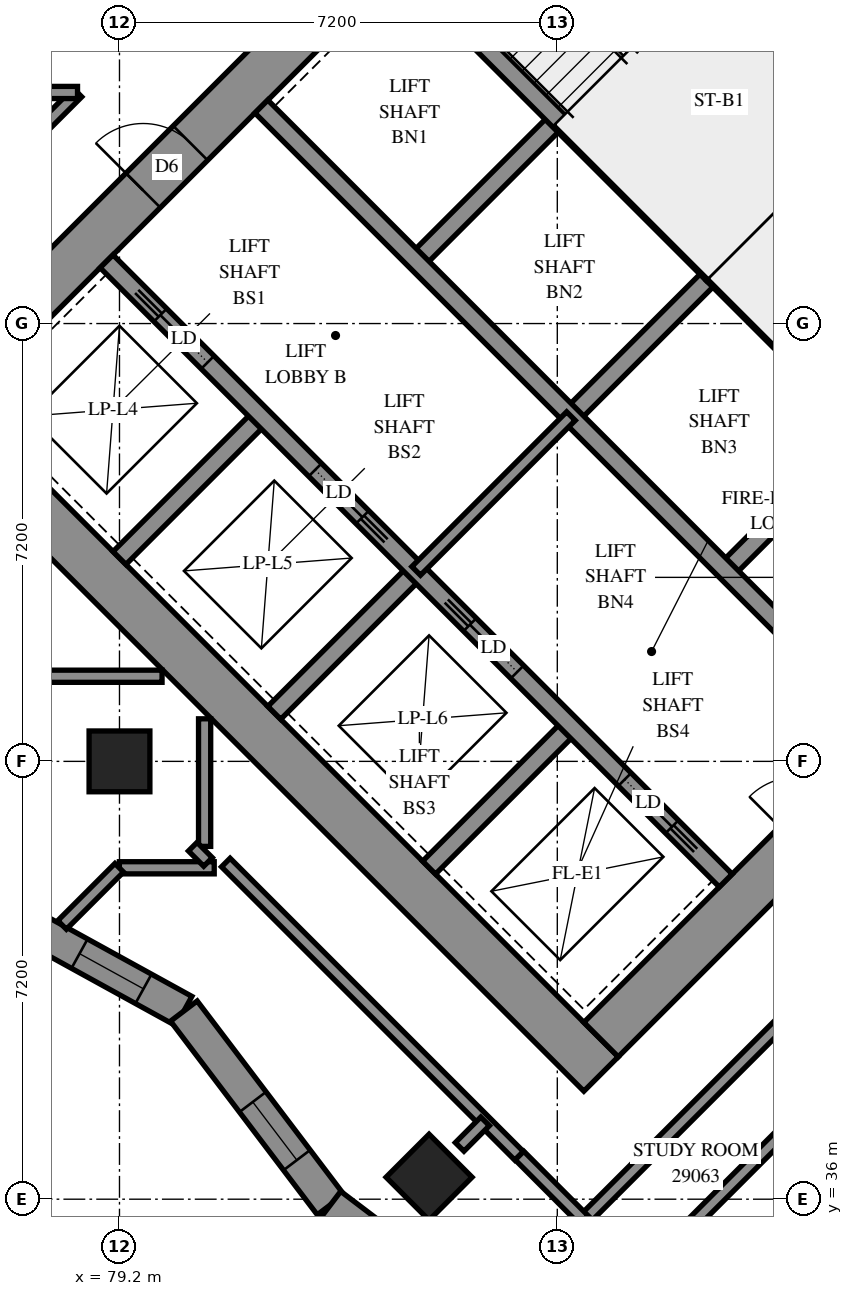
"""IFC4 building model, lengths in metres.
Left out: names, types, materials, properties, quantities, classifications, styles, units other than length and angle.
Written with IfcOpenShell. Run it as: python <this file> out.ifc"""

import sys

from ifc_helpers import new_model, si_unit, direction, frame, frame_2d, origin, origin_2d, place, context, subcontext, project, spatial, polyline, rectangle, outline, extrude, element, fill, save


model = new_model("IFC4")
c1 = context("Model", 3, precision=1e-05, world=origin(), true_north=direction((0.0, 1.0)))
c2 = subcontext(c1, "Body", "Model", "MODEL_VIEW")
j1 = project(units=[si_unit("LENGTHUNIT", "METRE"), si_unit("PLANEANGLEUNIT", "RADIAN")], contexts=[c1])
p1 = place(None, origin())
s1 = spatial("IfcSite", under=j1, at=p1, CompositionType="ELEMENT")
p2 = place(p1, origin())
s2 = spatial("IfcBuilding", under=s1, at=p2, CompositionType="ELEMENT")
p3 = place(p2, frame((0.0, 0.0, 108.4)))
s3 = spatial("IfcBuildingStorey", under=s2, at=p3, CompositionType="ELEMENT", Elevation=108.4)
for number, where, z_axis, x_axis in (
    (1, (79.2, 43.2, 0.0), (0.0, 0.0, 1.0), (1.0, 0.0, 0.0)),
    (2, (84.291, 36.362, 0.0), (0.0, 0.0, 1.0), (0.707, -0.707, 0.0)),
):
    element("IfcColumn", number, at=place(p3, frame(where, z_axis=z_axis, x_axis=x_axis)), inside=s3, PredefinedType="COLUMN", context=c2, shape_type="SweptSolid", body=[
        extrude(rectangle(XDim=1.0, YDim=1.0, at=origin_2d()), origin(), (0.0, 0.0, 1.0), 3.1),
    ])
p4 = place(p3, frame((75.806, 49.373, -0.3), z_axis=(0.0, 0.0, 1.0), x_axis=(0.7071067812, -0.7071067812, 0.0)))
e3 = element("IfcWall", 3, at=p4, inside=s3, PredefinedType="SHEAR", context=c2, shape_type="SweptSolid", body=[
    extrude(rectangle(XDim=16.0, YDim=0.8, at=frame_2d((8.0, 0.0))), origin(), (0.0, 0.0, 1.0), 2.7),
])
p5 = place(p3, frame((86.554, 60.121, -0.3), z_axis=(0.0, 0.0, 1.0), x_axis=(0.7071067812, -0.7071067812, 0.0)))
e4 = element("IfcWall", 4, at=p5, inside=s3, PredefinedType="SHEAR", context=c2, shape_type="SweptSolid", body=[
    extrude(rectangle(XDim=16.0, YDim=0.8, at=frame_2d((8.0, 0.0))), origin(), (0.0, 0.0, 1.0), 2.7),
])
p6 = place(p5, frame((10.8, 0.0, 0.3)))
e5 = element("IfcOpeningElement", 5, at=p6, cuts=e4, PredefinedType="OPENING", context=c2, shape_type="SweptSolid", body=[
    extrude(rectangle(XDim=0.8, YDim=2.1, at=frame_2d((0.4, 1.05))), frame((0.0, 0.41, 0.0), z_axis=(0.0, -1.0, 0.0), x_axis=(1.0, 0.0, 0.0)), (0.0, 0.0, 1.0), 0.82),
])
p7 = place(p3, frame((76.372, 49.373, -0.3), z_axis=(0.0, 0.0, 1.0), x_axis=(0.7071067812, 0.7071067812, 0.0)))
e6 = element("IfcWall", 6, at=p7, inside=s3, PredefinedType="SHEAR", context=c2, shape_type="SweptSolid", body=[
    extrude(rectangle(XDim=14.4, YDim=0.8, at=frame_2d((7.2, 0.0))), origin(), (0.0, 0.0, 1.0), 2.7),
])
p8 = place(p7, frame((4.55, 0.0, 0.3)))
e7 = element("IfcOpeningElement", 7, at=p8, cuts=e6, PredefinedType="OPENING", context=c2, shape_type="SweptSolid", body=[
    extrude(rectangle(XDim=1.1, YDim=2.1, at=frame_2d((0.55, 1.05))), frame((0.0, 0.41, 0.0), z_axis=(0.0, -1.0, 0.0), x_axis=(1.0, 0.0, 0.0)), (0.0, 0.0, 1.0), 0.82),
])
p9 = place(p7, frame((11.35, 0.0, 0.3)))
e8 = element("IfcOpeningElement", 8, at=p9, cuts=e6, PredefinedType="OPENING", context=c2, shape_type="SweptSolid", body=[
    extrude(rectangle(XDim=1.1, YDim=2.1, at=frame_2d((0.55, 1.05))), frame((0.0, 0.41, 0.0), z_axis=(0.0, -1.0, 0.0), x_axis=(1.0, 0.0, 0.0)), (0.0, 0.0, 1.0), 0.82),
])
p10 = place(p3, frame((87.12, 38.625, -0.3), z_axis=(0.0, 0.0, 1.0), x_axis=(0.7071067812, 0.7071067812, 0.0)))
e9 = element("IfcWall", 9, at=p10, inside=s3, PredefinedType="SHEAR", context=c2, shape_type="SweptSolid", body=[
    extrude(rectangle(XDim=14.4, YDim=0.8, at=frame_2d((7.2, 0.0))), origin(), (0.0, 0.0, 1.0), 2.7),
])
p11 = place(p10, frame((4.55, 0.0, 0.3)))
e10 = element("IfcOpeningElement", 10, at=p11, cuts=e9, PredefinedType="OPENING", context=c2, shape_type="SweptSolid", body=[
    extrude(rectangle(XDim=1.1, YDim=2.1, at=frame_2d((0.55, 1.05))), frame((0.0, 0.41, 0.0), z_axis=(0.0, -1.0, 0.0), x_axis=(1.0, 0.0, 0.0)), (0.0, 0.0, 1.0), 0.82),
])
p12 = place(p10, frame((11.35, 0.0, 0.3)))
e11 = element("IfcOpeningElement", 11, at=p12, cuts=e9, PredefinedType="OPENING", context=c2, shape_type="SweptSolid", body=[
    extrude(rectangle(XDim=1.1, YDim=2.1, at=frame_2d((0.55, 1.05))), frame((0.0, 0.41, 0.0), z_axis=(0.0, -1.0, 0.0), x_axis=(1.0, 0.0, 0.0)), (0.0, 0.0, 1.0), 0.82),
])
for number, where, z_axis, x_axis in (
    (12, (79.2, 46.544, 0.0), (0.0, 0.0, 1.0), (0.707, 0.707, 0.0)),
    (13, (84.079, 51.423, 0.0), (0.0, 0.0, 1.0), (0.707, 0.707, 0.0)),
):
    element("IfcWall", number, at=place(p3, frame(where, z_axis=z_axis, x_axis=x_axis)), inside=s3, PredefinedType="SOLIDWALL", context=c2, shape_type="SweptSolid", body=[
        extrude(rectangle(XDim=3.3, YDim=0.3, at=frame_2d((1.65, 0.0))), origin(), (0.0, 0.0, 1.0), 3.1),
    ])
p13 = place(p3, frame((81.746, 43.999, 0.0), z_axis=(0.0, 0.0, 1.0), x_axis=(0.7071067812, 0.7071067812, 0.0)))
e14 = element("IfcWall", 14, at=p13, inside=s3, PredefinedType="SOLIDWALL", context=c2, shape_type="SweptSolid", body=[
    extrude(rectangle(XDim=3.3, YDim=0.3, at=frame_2d((1.65, 0.0))), origin(), (0.0, 0.0, 1.0), 3.1),
])
p14 = place(p3, frame((86.625, 48.878, 0.0), z_axis=(0.0, 0.0, 1.0), x_axis=(0.7071067812, 0.7071067812, 0.0)))
e15 = element("IfcWall", 15, at=p14, inside=s3, PredefinedType="SOLIDWALL", context=c2, shape_type="SweptSolid", body=[
    extrude(rectangle(XDim=3.3, YDim=0.3, at=frame_2d((1.65, 0.0))), origin(), (0.0, 0.0, 1.0), 3.1),
])
p15 = place(p3, frame((84.291, 41.453, 0.0), z_axis=(0.0, 0.0, 1.0), x_axis=(0.7071067812, 0.7071067812, 0.0)))
e16 = element("IfcWall", 16, at=p15, inside=s3, PredefinedType="SOLIDWALL", context=c2, shape_type="SweptSolid", body=[
    extrude(rectangle(XDim=3.3, YDim=0.3, at=frame_2d((1.65, 0.0))), origin(), (0.0, 0.0, 1.0), 3.1),
])
p16 = place(p3, frame((89.17, 46.332, 0.0), z_axis=(0.0, 0.0, 1.0), x_axis=(0.7071067812, 0.7071067812, 0.0)))
e17 = element("IfcWall", 17, at=p16, inside=s3, PredefinedType="SOLIDWALL", context=c2, shape_type="SweptSolid", body=[
    extrude(rectangle(XDim=3.3, YDim=0.3, at=frame_2d((1.65, 0.0))), origin(), (0.0, 0.0, 1.0), 3.1),
])
p17 = place(p3, frame((78.988, 51.423, 0.0), z_axis=(0.0, 0.0, 1.0), x_axis=(0.7071067812, -0.7071067812, 0.0)))
e18 = element("IfcWall", 18, at=p17, inside=s3, PredefinedType="SOLIDWALL", context=c2, shape_type="SweptSolid", body=[
    extrude(rectangle(XDim=14.4, YDim=0.3, at=frame_2d((7.2, 0.0))), origin(), (0.0, 0.0, 1.0), 3.1),
])
p18 = place(p17, frame((1.25, 0.0, 0.0)))
e19 = element("IfcOpeningElement", 19, at=p18, cuts=e18, PredefinedType="OPENING", context=c2, shape_type="SweptSolid", body=[
    extrude(rectangle(XDim=1.1, YDim=2.1, at=frame_2d((0.55, 1.05))), frame((0.0, 0.16, 0.0), z_axis=(0.0, -1.0, 0.0), x_axis=(1.0, 0.0, 0.0)), (0.0, 0.0, 1.0), 0.32),
])
p19 = place(p17, frame((4.85, 0.0, 0.0)))
e20 = element("IfcOpeningElement", 20, at=p19, cuts=e18, PredefinedType="OPENING", context=c2, shape_type="SweptSolid", body=[
    extrude(rectangle(XDim=1.1, YDim=2.1, at=frame_2d((0.55, 1.05))), frame((0.0, 0.16, 0.0), z_axis=(0.0, -1.0, 0.0), x_axis=(1.0, 0.0, 0.0)), (0.0, 0.0, 1.0), 0.32),
])
p20 = place(p17, frame((8.45, 0.0, 0.0)))
e21 = element("IfcOpeningElement", 21, at=p20, cuts=e18, PredefinedType="OPENING", context=c2, shape_type="SweptSolid", body=[
    extrude(rectangle(XDim=1.1, YDim=2.1, at=frame_2d((0.55, 1.05))), frame((0.0, 0.16, 0.0), z_axis=(0.0, -1.0, 0.0), x_axis=(1.0, 0.0, 0.0)), (0.0, 0.0, 1.0), 0.32),
])
p21 = place(p17, frame((12.05, 0.0, 0.0)))
e22 = element("IfcOpeningElement", 22, at=p21, cuts=e18, PredefinedType="OPENING", context=c2, shape_type="SweptSolid", body=[
    extrude(rectangle(XDim=1.1, YDim=2.1, at=frame_2d((0.55, 1.05))), frame((0.0, 0.16, 0.0), z_axis=(0.0, -1.0, 0.0), x_axis=(1.0, 0.0, 0.0)), (0.0, 0.0, 1.0), 0.32),
])
p22 = place(p3, frame((81.534, 53.969, 0.0), z_axis=(0.0, 0.0, 1.0), x_axis=(0.707103309, -0.7071102534, 0.0)))
e23 = element("IfcWall", 23, at=p22, inside=s3, PredefinedType="SOLIDWALL", context=c2, shape_type="SweptSolid", body=[
    extrude(rectangle(XDim=14.4, YDim=0.3, at=frame_2d((7.2, 0.0))), origin(), (0.0, 0.0, 1.0), 3.1),
])
p23 = place(p22, frame((12.05, 0.0, 0.0)))
e24 = element("IfcOpeningElement", 24, at=p23, cuts=e23, PredefinedType="OPENING", context=c2, shape_type="SweptSolid", body=[
    extrude(rectangle(XDim=1.1, YDim=2.1, at=frame_2d((0.55, 1.05))), frame((0.0, 0.16, 0.0), z_axis=(0.0, -1.0, 0.0), x_axis=(1.0, 0.0, 0.0)), (0.0, 0.0, 1.0), 0.32),
])
for number, where, z_axis, x_axis in (
    (25, (83.867, 56.302, 0.0), (0.0, 0.0, 1.0), (0.707, -0.707, 0.0)),
    (26, (88.958, 51.211, 0.0), (0.0, 0.0, 1.0), (0.707, -0.707, 0.0)),
):
    element("IfcWall", number, at=place(p3, frame(where, z_axis=z_axis, x_axis=x_axis)), inside=s3, PredefinedType="SOLIDWALL", context=c2, shape_type="SweptSolid", body=[
        extrude(rectangle(XDim=7.2, YDim=0.3, at=frame_2d((3.6, 0.0))), origin(), (0.0, 0.0, 1.0), 3.1),
    ])
p24 = place(p3, frame((88.958, 51.211, 0.0), z_axis=(0.0, 0.0, 1.0), x_axis=(0.7071067812, 0.7071067812, 0.0)))
e27 = element("IfcWall", 27, at=p24, inside=s3, PredefinedType="SOLIDWALL", context=c2, shape_type="SweptSolid", body=[
    extrude(rectangle(XDim=4.2, YDim=0.3, at=frame_2d((2.1, 0.0))), origin(), (0.0, 0.0, 1.0), 3.1),
])
p25 = place(p3, frame((76.594, 41.111, 0.0), z_axis=(0.0, 0.0, 1.0), x_axis=(0.8760886881, -0.4821499877, 0.0)))
e28 = element("IfcWall", 28, at=p25, inside=s3, PredefinedType="SOLIDWALL", context=c2, shape_type="SweptSolid", body=[
    extrude(outline(polyline([(0.025, -0.275), (4.125, -0.275), (4.242, 0.275), (-0.025, 0.275), (0.025, -0.275)])), origin(), (0.0, 0.0, 1.0), 3.1),
])
p26 = place(p25, frame((0.334, 0.0, 0.5)))
e29 = element("IfcOpeningElement", 29, at=p26, cuts=e28, PredefinedType="OPENING", context=c2, shape_type="SweptSolid", body=[
    extrude(rectangle(XDim=1.2, YDim=2.45, at=frame_2d((0.6, 1.225))), frame((0.0, 0.285, 0.0), z_axis=(0.0, -1.0, 0.0), x_axis=(1.0, 0.0, 0.0)), (0.0, 0.0, 1.0), 0.57),
])
p27 = place(p25, frame((2.225, 0.0, 0.5)))
e30 = element("IfcOpeningElement", 30, at=p27, cuts=e28, PredefinedType="OPENING", context=c2, shape_type="SweptSolid", body=[
    extrude(rectangle(XDim=1.2, YDim=2.45, at=frame_2d((0.6, 1.225))), frame((0.0, 0.285, 0.0), z_axis=(0.0, -1.0, 0.0), x_axis=(1.0, 0.0, 0.0)), (0.0, 0.0, 1.0), 0.57),
])
p28 = place(p3, frame((80.258, 39.094, 0.0), z_axis=(0.0, 0.0, 1.0), x_axis=(0.6040769252, -0.7969260119, 0.0)))
e31 = element("IfcWall", 31, at=p28, inside=s3, PredefinedType="SOLIDWALL", context=c2, shape_type="SweptSolid", body=[
    extrude(outline(polyline([(0.059, -0.275), (4.033, -0.275), (3.958, 0.275), (-0.059, 0.275), (0.059, -0.275)])), origin(), (0.0, 0.0, 1.0), 3.1),
])
p29 = place(p28, frame((1.876, 0.0, 0.5)))
e32 = element("IfcOpeningElement", 32, at=p29, cuts=e31, PredefinedType="OPENING", context=c2, shape_type="SweptSolid", body=[
    extrude(rectangle(XDim=1.2, YDim=2.45, at=frame_2d((0.6, 1.225))), frame((0.0, 0.285, 0.0), z_axis=(0.0, -1.0, 0.0), x_axis=(1.0, 0.0, 0.0)), (0.0, 0.0, 1.0), 0.57),
])
p30 = place(p3, frame((82.672, 35.91, 0.0), z_axis=(0.0, 0.0, 1.0), x_axis=(0.7969251465, -0.6040780669, 0.0)))
e33 = element("IfcWall", 33, at=p30, inside=s3, PredefinedType="SOLIDWALL", context=c2, shape_type="SweptSolid", body=[
    extrude(outline(polyline([(-0.038, -0.275), (3.937, -0.275), (4.013, 0.275), (0.038, 0.275), (-0.038, -0.275)])), origin(), (0.0, 0.0, 1.0), 3.1),
])
p31 = place(p30, frame((1.704, 0.0, 0.5)))
e34 = element("IfcOpeningElement", 34, at=p31, cuts=e33, PredefinedType="OPENING", context=c2, shape_type="SweptSolid", body=[
    extrude(rectangle(XDim=1.2, YDim=2.45, at=frame_2d((0.6, 1.225))), frame((0.0, 0.285, 0.0), z_axis=(0.0, -1.0, 0.0), x_axis=(1.0, 0.0, 0.0)), (0.0, 0.0, 1.0), 0.57),
])
p32 = place(p3, frame((84.079, 46.332, 0.0), z_axis=(0.0, 0.0, 1.0), x_axis=(0.7071067812, 0.7071067812, 0.0)))
e35 = element("IfcWall", 35, at=p32, inside=s3, PredefinedType="PARTITIONING", context=c2, shape_type="SweptSolid", body=[
    extrude(rectangle(XDim=3.6, YDim=0.2, at=frame_2d((1.8, 0.0))), origin(), (0.0, 0.0, 1.0), 3.1),
])
p33 = place(p3, frame((87.894, 61.461, 0.0), z_axis=(0.0, 0.0, 1.0), x_axis=(0.7071067812, -0.7071067812, 0.0)))
e36 = element("IfcWall", 36, at=p33, inside=s3, PredefinedType="PARTITIONING", context=c2, shape_type="SweptSolid", body=[
    extrude(rectangle(XDim=10.428, YDim=0.2, at=frame_2d((5.214, 0.0))), origin(), (0.0, 0.0, 1.0), 3.1),
])
p34 = place(p33, frame((6.39, 0.0, 0.0)))
e37 = element("IfcOpeningElement", 37, at=p34, cuts=e36, PredefinedType="OPENING", context=c2, shape_type="SweptSolid", body=[
    extrude(rectangle(XDim=0.9, YDim=2.1, at=frame_2d((0.45, 1.05))), frame((0.0, 0.11, 0.0), z_axis=(0.0, -1.0, 0.0), x_axis=(1.0, 0.0, 0.0)), (0.0, 0.0, 1.0), 0.22),
])
p35 = place(p3, frame((86.835, 35.655, 0.0), z_axis=(0.0, 0.0, 1.0), x_axis=(0.7071067812, 0.7071067812, 0.0)))
e38 = element("IfcWall", 38, at=p35, inside=s3, PredefinedType="PARTITIONING", context=c2, shape_type="SweptSolid", body=[
    extrude(rectangle(XDim=7.3, YDim=0.2, at=frame_2d((3.65, 0.0))), origin(), (0.0, 0.0, 1.0), 3.1),
])
p36 = place(p35, frame((6.046, 0.0, 0.0)))
e39 = element("IfcOpeningElement", 39, at=p36, cuts=e38, PredefinedType="OPENING", context=c2, shape_type="SweptSolid", body=[
    extrude(rectangle(XDim=1.0, YDim=2.1, at=frame_2d((0.5, 1.05))), frame((0.0, 0.11, 0.0), z_axis=(0.0, -1.0, 0.0), x_axis=(1.0, 0.0, 0.0)), (0.0, 0.0, 1.0), 0.22),
])
p37 = place(p3, frame((86.334, 33.312, 0.0), z_axis=(0.0, 0.0, 1.0), x_axis=(0.7069693124, 0.7072442232, 0.0)))
e40 = element("IfcWall", 40, at=p37, inside=s3, PredefinedType="PARTITIONING", context=c2, shape_type="SweptSolid", body=[
    extrude(rectangle(XDim=6.911, YDim=0.2, at=frame_2d((3.456, 0.0))), origin(), (0.0, 0.0, 1.0), 3.1),
])
p38 = place(p3, frame((80.948, 41.536, 0.0), z_axis=(0.0, 0.0, 1.0), x_axis=(0.7071067812, -0.7071067812, 0.0)))
e41 = element("IfcWall", 41, at=p38, inside=s3, PredefinedType="PARTITIONING", context=c2, shape_type="SweptSolid", body=[
    extrude(rectangle(XDim=6.822, YDim=0.2, at=frame_2d((3.411, 0.0))), origin(), (0.0, 0.0, 1.0), 3.1),
])
p39 = place(p3, frame((74.301, 49.991, 0.0), z_axis=(0.0, 0.0, 1.0), x_axis=(0.7071067812, 0.7071067812, 0.0)))
e42 = element("IfcWall", 42, at=p39, inside=s3, PredefinedType="PARTITIONING", context=c2, shape_type="SweptSolid", body=[
    extrude(rectangle(XDim=5.951, YDim=0.2, at=frame_2d((2.975, 0.0))), origin(), (0.0, 0.0, 1.0), 3.1),
])
p40 = place(p3, frame((89.881, 31.771, 0.0), z_axis=(0.0, 0.0, 1.0), x_axis=(0.7071067812, 0.7071067812, 0.0)))
e43 = element("IfcWall", 43, at=p40, inside=s3, PredefinedType="PARTITIONING", context=c2, shape_type="SweptSolid", body=[
    extrude(rectangle(XDim=5.787, YDim=0.2, at=frame_2d((2.893, 0.0))), origin(), (0.0, 0.0, 1.0), 3.1),
])
p41 = place(p3, frame((74.302, 54.2, 0.0), z_axis=(0.0, 0.0, 1.0), x_axis=(1.0, 0.0, 0.0)))
e44 = element("IfcWall", 44, at=p41, inside=s3, PredefinedType="PARTITIONING", context=c2, shape_type="SweptSolid", body=[
    extrude(rectangle(XDim=4.208, YDim=0.2, at=frame_2d((2.104, 0.0))), origin(), (0.0, 0.0, 1.0), 3.1),
])
p42 = place(p41, frame((0.86, 0.0, 0.0)))
e45 = element("IfcOpeningElement", 45, at=p42, cuts=e44, PredefinedType="OPENING", context=c2, shape_type="SweptSolid", body=[
    extrude(rectangle(XDim=1.0, YDim=2.1, at=frame_2d((0.5, 1.05))), frame((0.0, 0.11, 0.0), z_axis=(0.0, -1.0, 0.0), x_axis=(1.0, 0.0, 0.0)), (0.0, 0.0, 1.0), 0.22),
])
for number, where, z_axis, x_axis in (
    (46, (77.802, 44.6, 0.0), (0.0, 0.0, 1.0), (1.0, 0.0, 0.0)),
    (47, (80.6, 41.802, 0.0), (0.0, 0.0, 1.0), (0.0, 1.0, 0.0)),
):
    element("IfcWall", number, at=place(p3, frame(where, z_axis=z_axis, x_axis=x_axis)), inside=s3, PredefinedType="PARTITIONING", context=c2, shape_type="SweptSolid", body=[
        extrude(rectangle(XDim=2.098, YDim=0.2, at=frame_2d((1.049, 0.0))), origin(), (0.0, 0.0, 1.0), 3.1),
    ])
p43 = place(p3, frame((79.198, 41.45, 0.0), z_axis=(0.0, 0.0, 1.0), x_axis=(1.0, 0.0, 0.0)))
e48 = element("IfcWall", 48, at=p43, inside=s3, PredefinedType="PARTITIONING", context=c2, shape_type="SweptSolid", body=[
    extrude(rectangle(XDim=1.56, YDim=0.2, at=frame_2d((0.78, 0.0))), origin(), (0.0, 0.0, 1.0), 3.1),
])
p44 = place(p3, frame((85.778, 36.718, 0.0), z_axis=(0.0, 0.0, 1.0), x_axis=(0.7064400143, -0.70777292, 0.0)))
e49 = element("IfcWall", 49, at=p44, inside=s3, PredefinedType="PARTITIONING", context=c2, shape_type="SweptSolid", body=[
    extrude(rectangle(XDim=1.5, YDim=0.2, at=frame_2d((0.75, 0.0))), origin(), (0.0, 0.0, 1.0), 3.1),
])
p45 = place(p3, frame((78.256, 40.51, 0.0), z_axis=(0.0, 0.0, 1.0), x_axis=(0.7071067812, 0.7071067812, 0.0)))
e50 = element("IfcWall", 50, at=p45, inside=s3, PredefinedType="PARTITIONING", context=c2, shape_type="SweptSolid", body=[
    extrude(rectangle(XDim=1.329, YDim=0.2, at=frame_2d((0.665, 0.0))), origin(), (0.0, 0.0, 1.0), 3.1),
])
p46 = place(p3, frame((84.794, 36.86, 0.0), z_axis=(0.0, 0.0, 1.0), x_axis=(0.7054171665, 0.7087923682, 0.0)))
e51 = element("IfcWall", 51, at=p46, inside=s3, PredefinedType="PARTITIONING", context=c2, shape_type="SweptSolid", body=[
    extrude(rectangle(XDim=0.593, YDim=0.2, at=frame_2d((0.296, 0.0))), origin(), (0.0, 0.0, 1.0), 3.1),
])
p47 = place(p3, frame((80.405, 41.797, 0.0), z_axis=(0.0, 0.0, 1.0), x_axis=(0.7071067812, -0.7071067812, 0.0)))
e52 = element("IfcWall", 52, at=p47, inside=s3, PredefinedType="PARTITIONING", context=c2, shape_type="SweptSolid", body=[
    extrude(rectangle(XDim=0.355, YDim=0.2, at=frame_2d((0.177, 0.0))), origin(), (0.0, 0.0, 1.0), 3.1),
])
p48 = place(p27, origin())
e53 = element("IfcWindow", 53, at=p48, inside=s3, PartitioningType="SINGLE_PANEL", PredefinedType="WINDOW", context=c2, shape_type="SweptSolid", body=[
    extrude(rectangle(XDim=1.2, YDim=2.45, at=frame_2d((0.6, 1.225))), frame((0.0, 0.155, 0.0), z_axis=(0.0, -1.0, 0.0), x_axis=(1.0, 0.0, 0.0)), (0.0, 0.0, 1.0), 0.06),
])
fill(e30, e53)
p49 = place(p29, origin())
e54 = element("IfcWindow", 54, at=p49, inside=s3, PartitioningType="SINGLE_PANEL", PredefinedType="WINDOW", context=c2, shape_type="SweptSolid", body=[
    extrude(rectangle(XDim=1.2, YDim=2.45, at=frame_2d((0.6, 1.225))), frame((0.0, 0.155, 0.0), z_axis=(0.0, -1.0, 0.0), x_axis=(1.0, 0.0, 0.0)), (0.0, 0.0, 1.0), 0.06),
])
fill(e32, e54)
p50 = place(p8, origin())
e55 = element("IfcDoor", 55, at=p50, inside=s3, OperationType="DOUBLE_DOOR_SINGLE_SWING", PredefinedType="DOOR", context=c2, shape_type="SweptSolid", body=[
    extrude(rectangle(XDim=1.1, YDim=2.1, at=frame_2d((0.55, 1.05))), frame((0.0, 0.025, 0.0), z_axis=(0.0, -1.0, 0.0), x_axis=(1.0, 0.0, 0.0)), (0.0, 0.0, 1.0), 0.05),
])
fill(e7, e55)
p51 = place(p18, origin())
e56 = element("IfcDoor", 56, at=p51, inside=s3, OperationType="SLIDING_TO_LEFT", PredefinedType="DOOR", context=c2, shape_type="SweptSolid", body=[
    extrude(rectangle(XDim=1.1, YDim=2.1, at=frame_2d((0.55, 1.05))), frame((0.0, 0.025, 0.0), z_axis=(0.0, -1.0, 0.0), x_axis=(1.0, 0.0, 0.0)), (0.0, 0.0, 1.0), 0.05),
])
fill(e19, e56)
p52 = place(p19, origin())
e57 = element("IfcDoor", 57, at=p52, inside=s3, OperationType="SLIDING_TO_RIGHT", PredefinedType="DOOR", context=c2, shape_type="SweptSolid", body=[
    extrude(rectangle(XDim=1.1, YDim=2.1, at=frame_2d((0.55, 1.05))), frame((0.0, 0.025, 0.0), z_axis=(0.0, -1.0, 0.0), x_axis=(1.0, 0.0, 0.0)), (0.0, 0.0, 1.0), 0.05),
])
fill(e20, e57)
p53 = place(p20, origin())
e58 = element("IfcDoor", 58, at=p53, inside=s3, OperationType="SLIDING_TO_LEFT", PredefinedType="DOOR", context=c2, shape_type="SweptSolid", body=[
    extrude(rectangle(XDim=1.1, YDim=2.1, at=frame_2d((0.55, 1.05))), frame((0.0, 0.025, 0.0), z_axis=(0.0, -1.0, 0.0), x_axis=(1.0, 0.0, 0.0)), (0.0, 0.0, 1.0), 0.05),
])
fill(e21, e58)
p54 = place(p21, origin())
e59 = element("IfcDoor", 59, at=p54, inside=s3, OperationType="SLIDING_TO_RIGHT", PredefinedType="DOOR", context=c2, shape_type="SweptSolid", body=[
    extrude(rectangle(XDim=1.1, YDim=2.1, at=frame_2d((0.55, 1.05))), frame((0.0, 0.025, 0.0), z_axis=(0.0, -1.0, 0.0), x_axis=(1.0, 0.0, 0.0)), (0.0, 0.0, 1.0), 0.05),
])
fill(e22, e59)
save(model, sys.argv[1])
